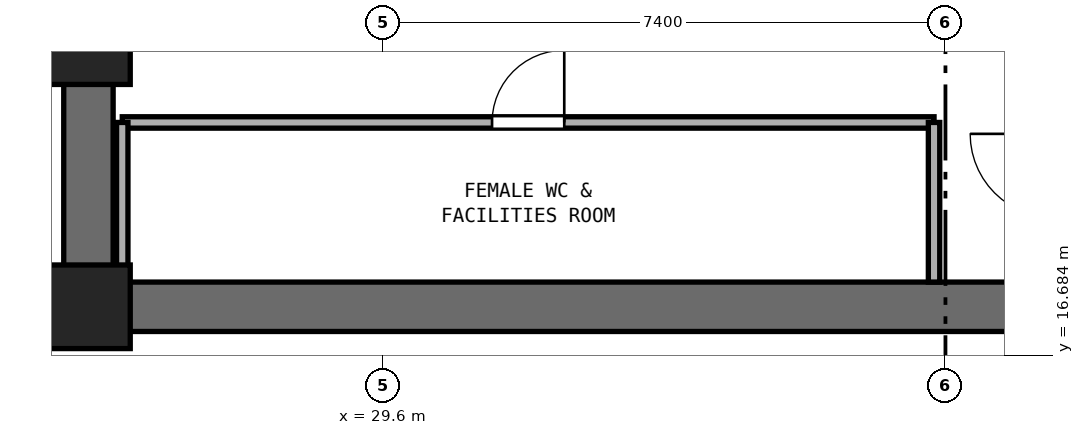
"""IFC4 building model, lengths in metres.
Left out: names, types, materials, properties, quantities, classifications, styles, units other than length and angle.
Written with IfcOpenShell. Run it as: python <this file> out.ifc"""

import sys

from ifc_helpers import new_model, si_unit, direction, frame, frame_2d, origin, origin_2d, place, context, subcontext, project, spatial, rectangle, extrude, element, fill, save


model = new_model("IFC4")
c1 = context("Model", 3, precision=1e-05, world=origin(), true_north=direction((0.0, 1.0)))
c2 = subcontext(c1, "Body", "Model", "MODEL_VIEW")
j1 = project(units=[si_unit("LENGTHUNIT", "METRE"), si_unit("PLANEANGLEUNIT", "RADIAN")], contexts=[c1])
p1 = place(None, origin())
s1 = spatial("IfcSite", under=j1, at=p1, CompositionType="ELEMENT")
p2 = place(p1, origin())
s2 = spatial("IfcBuilding", under=s1, at=p2, CompositionType="ELEMENT")
p3 = place(p2, frame((0.0, 0.0, 66.8)))
s3 = spatial("IfcBuildingStorey", under=s2, at=p3, CompositionType="ELEMENT", Elevation=66.8)
p4 = place(p3, frame((25.4, 17.325, 0.0), z_axis=(0.0, 0.0, 1.0), x_axis=(1.0, 0.0, 0.0)))
e1 = element("IfcWall", 1, at=p4, inside=s3, PredefinedType="SHEAR", context=c2, shape_type="SweptSolid", body=[
    extrude(rectangle(XDim=23.2, YDim=0.65, at=frame_2d((11.6, 0.0))), origin(), (0.0, 0.0, 1.0), 3.525),
])
p5 = place(p3, frame((25.725, 17.65, 0.0), z_axis=(0.0, 0.0, 1.0), x_axis=(0.0, 1.0, 0.0)))
e2 = element("IfcWall", 2, at=p5, inside=s3, PredefinedType="SHEAR", context=c2, shape_type="SweptSolid", body=[
    extrude(rectangle(XDim=15.1, YDim=0.65, at=frame_2d((7.55, 0.0))), origin(), (0.0, 0.0, 1.0), 3.525),
])
p6 = place(p5, frame((6.8, 0.0, 0.0)))
e3 = element("IfcOpeningElement", 3, at=p6, cuts=e2, PredefinedType="OPENING", context=c2, shape_type="SweptSolid", body=[
    extrude(rectangle(XDim=1.5, YDim=2.15, at=frame_2d((0.75, 1.075))), frame((0.0, 0.335, 0.0), z_axis=(0.0, -1.0, 0.0), x_axis=(1.0, 0.0, 0.0)), (0.0, 0.0, 1.0), 0.67),
])
for number, where, z_axis, x_axis in (
    (4, (25.725, 17.325, 0.0), (0.0, 0.0, 1.0), (1.0, 0.0, 0.0)),
    (5, (25.725, 20.8, 0.0), (0.0, 0.0, 1.0), (1.0, 0.0, 0.0)),
):
    element("IfcColumn", number, at=place(p3, frame(where, z_axis=z_axis, x_axis=x_axis)), inside=s3, PredefinedType="PILASTER", context=c2, shape_type="SweptSolid", body=[
        extrude(rectangle(XDim=1.1, YDim=1.1, at=origin_2d()), origin(), (0.0, 0.0, 1.0), 3.8),
    ])
p7 = place(p3, frame((26.17, 19.75, 0.0), z_axis=(0.0, 0.0, 1.0), x_axis=(1.0, 0.0, 0.0)))
e6 = element("IfcWall", 6, at=p7, inside=s3, PredefinedType="PARTITIONING", context=c2, shape_type="SweptSolid", body=[
    extrude(rectangle(XDim=10.68, YDim=0.15, at=frame_2d((5.34, 0.0))), origin(), (0.0, 0.0, 1.0), 3.525),
])
p8 = place(p7, frame((4.865, 0.0, 0.0)))
e7 = element("IfcOpeningElement", 7, at=p8, cuts=e6, PredefinedType="OPENING", context=c2, shape_type="SweptSolid", body=[
    extrude(rectangle(XDim=0.95, YDim=2.1, at=frame_2d((0.475, 1.05))), frame((0.0, 0.085, 0.0), z_axis=(0.0, -1.0, 0.0), x_axis=(1.0, 0.0, 0.0)), (0.0, 0.0, 1.0), 0.17),
])
for number, where, z_axis, x_axis in (
    (8, (26.17, 17.65, 0.0), (0.0, 0.0, 1.0), (0.0, 1.0, 0.0)),
    (9, (36.85, 17.65, 0.0), (0.0, 0.0, 1.0), (0.0, 1.0, 0.0)),
):
    element("IfcWall", number, at=place(p3, frame(where, z_axis=z_axis, x_axis=x_axis)), inside=s3, PredefinedType="PARTITIONING", context=c2, shape_type="SweptSolid", body=[
        extrude(rectangle(XDim=2.1, YDim=0.15, at=frame_2d((1.05, 0.0))), origin(), (0.0, 0.0, 1.0), 3.525),
    ])
p9 = place(p8, origin())
e10 = element("IfcDoor", 10, at=p9, inside=s3, OperationType="SINGLE_SWING_RIGHT", PredefinedType="DOOR", context=c2, shape_type="SweptSolid", body=[
    extrude(rectangle(XDim=0.95, YDim=2.1, at=frame_2d((0.475, 1.05))), frame((0.0, 0.025, 0.0), z_axis=(0.0, -1.0, 0.0), x_axis=(1.0, 0.0, 0.0)), (0.0, 0.0, 1.0), 0.05),
])
fill(e7, e10)
save(model, sys.argv[1])
